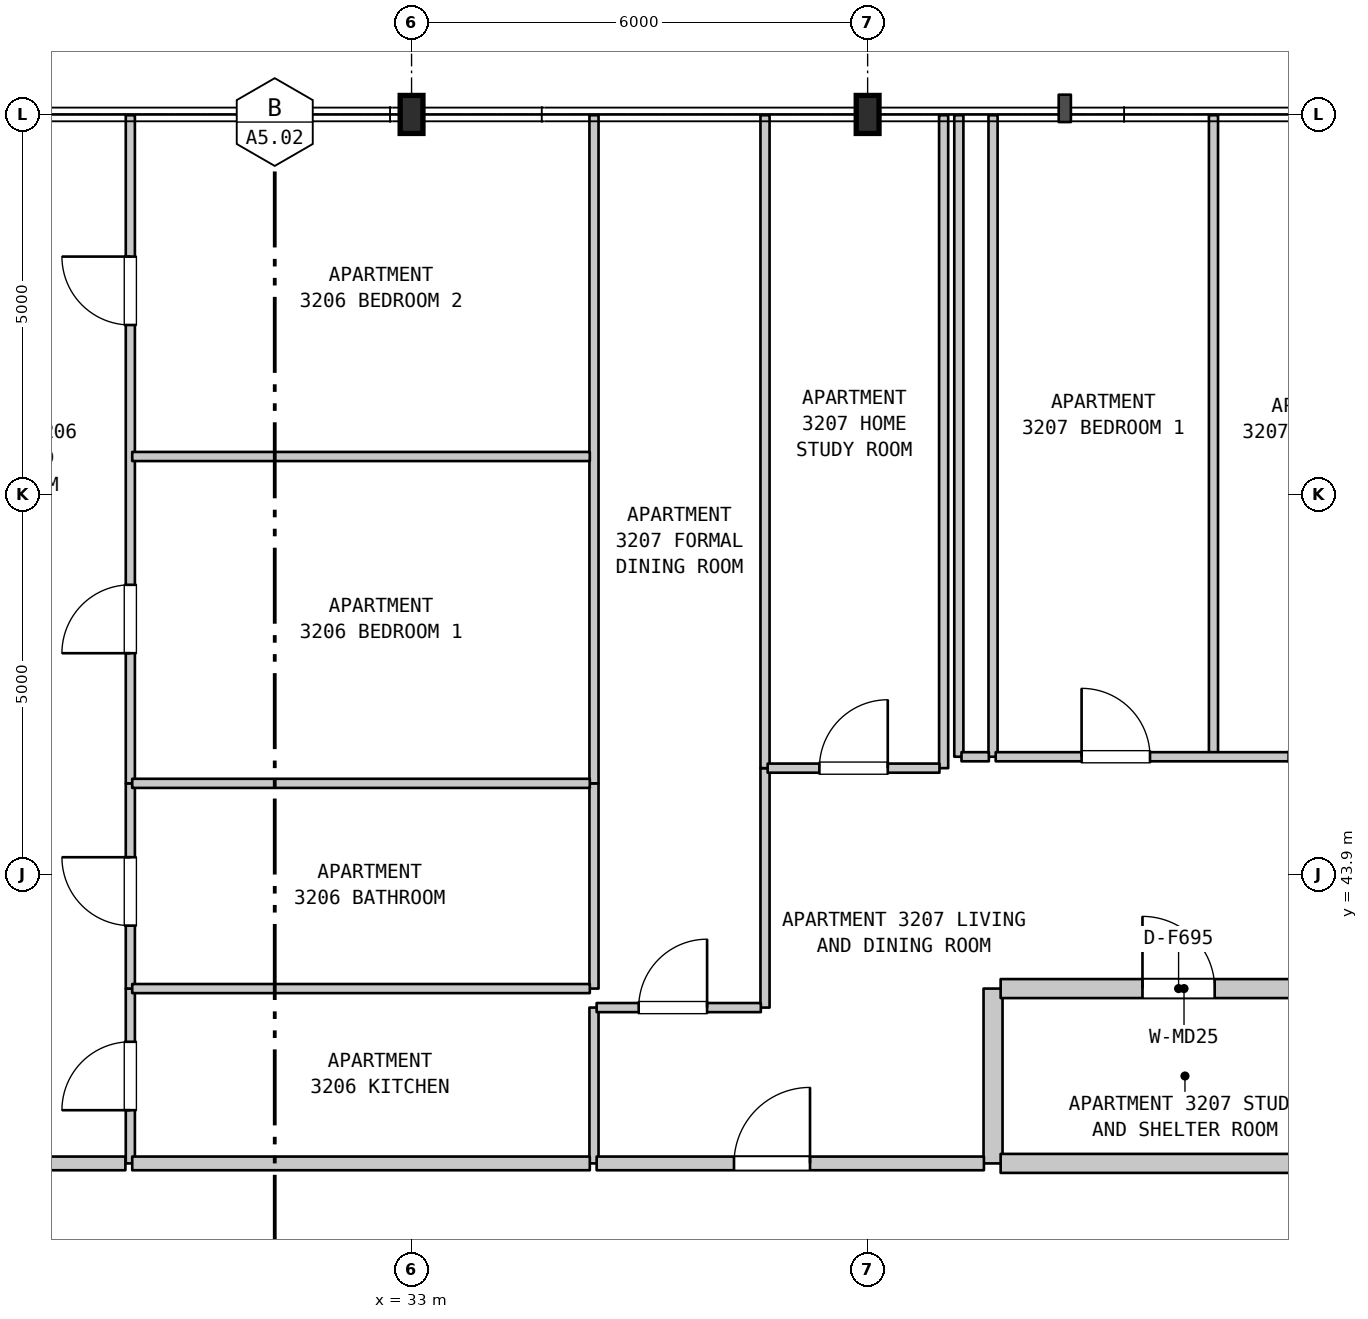
"""IFC4 building model, lengths in metres.
Left out: names, types, materials, properties, quantities, classifications, styles, units other than length and angle.
Written with IfcOpenShell. Run it as: python <this file> out.ifc"""

import sys

from ifc_helpers import new_model, si_unit, direction, frame, frame_2d, origin, origin_2d, place, context, subcontext, project, spatial, rectangle, i_section, extrude, element, fill, save


model = new_model("IFC4")
c1 = context("Model", 3, precision=1e-05, world=origin(), true_north=direction((0.0, 1.0)))
c2 = subcontext(c1, "Body", "Model", "MODEL_VIEW")
j1 = project(units=[si_unit("LENGTHUNIT", "METRE"), si_unit("PLANEANGLEUNIT", "RADIAN")], contexts=[c1])
p1 = place(None, origin())
s1 = spatial("IfcSite", under=j1, at=p1, CompositionType="ELEMENT")
p2 = place(p1, origin())
s2 = spatial("IfcBuilding", under=s1, at=p2, CompositionType="ELEMENT")
p3 = place(p2, frame((0.0, 0.0, 133.5)))
s3 = spatial("IfcBuildingStorey", under=s2, at=p3, CompositionType="ELEMENT", Elevation=133.5)
for number, where, z_axis, x_axis in (
    (1, (33.0, 53.9, 0.0), (0.0, 0.0, 1.0), (1.0, 0.0, 0.0)),
    (2, (39.0, 53.9, 0.0), (0.0, 0.0, 1.0), (1.0, 0.0, 0.0)),
):
    element("IfcColumn", number, at=place(p3, frame(where, z_axis=z_axis, x_axis=x_axis)), inside=s3, PredefinedType="COLUMN", context=c2, shape_type="SweptSolid", body=[
        extrude(i_section(OverallWidth=0.3, OverallDepth=0.5, WebThickness=0.014, FlangeThickness=0.028, FilletRadius=0.027, at=origin_2d()), origin(), (0.0, 0.0, 1.0), 3.7),
    ])
p4 = place(p3, frame((29.3, 40.1, 0.0), z_axis=(0.0, 0.0, 1.0), x_axis=(0.0, 1.0, 0.0)))
e3 = element("IfcWall", 3, at=p4, inside=s3, PredefinedType="PARTITIONING", context=c2, shape_type="SweptSolid", body=[
    extrude(rectangle(XDim=2.3, YDim=0.12, at=frame_2d((1.15, 0.0))), origin(), (0.0, 0.0, 1.0), 3.385),
])
p5 = place(p4, frame((0.7, 0.0, 0.0)))
e4 = element("IfcOpeningElement", 4, at=p5, cuts=e3, PredefinedType="OPENING", context=c2, shape_type="SweptSolid", body=[
    extrude(rectangle(XDim=0.9, YDim=2.15, at=frame_2d((0.45, 1.075))), frame((0.0, 0.07, 0.0), z_axis=(0.0, -1.0, 0.0), x_axis=(1.0, 0.0, 0.0)), (0.0, 0.0, 1.0), 0.14),
])
p6 = place(p3, frame((29.3, 42.4, 0.0), z_axis=(0.0, 0.0, 1.0), x_axis=(0.0, 1.0, 0.0)))
e5 = element("IfcWall", 5, at=p6, inside=s3, PredefinedType="PARTITIONING", context=c2, shape_type="SweptSolid", body=[
    extrude(rectangle(XDim=2.7, YDim=0.12, at=frame_2d((1.35, 0.0))), origin(), (0.0, 0.0, 1.0), 3.385),
])
p7 = place(p6, frame((0.828, 0.0, 0.0)))
e6 = element("IfcOpeningElement", 6, at=p7, cuts=e5, PredefinedType="OPENING", context=c2, shape_type="SweptSolid", body=[
    extrude(rectangle(XDim=0.9, YDim=2.1, at=frame_2d((0.45, 1.05))), frame((0.0, 0.07, 0.0), z_axis=(0.0, -1.0, 0.0), x_axis=(1.0, 0.0, 0.0)), (0.0, 0.0, 1.0), 0.14),
])
p8 = place(p3, frame((29.3, 45.1, 0.0), z_axis=(0.0, 0.0, 1.0), x_axis=(0.0, 1.0, 0.0)))
e7 = element("IfcWall", 7, at=p8, inside=s3, PredefinedType="PARTITIONING", context=c2, shape_type="SweptSolid", body=[
    extrude(rectangle(XDim=8.79, YDim=0.12, at=frame_2d((4.395, 0.0))), origin(), (0.0, 0.0, 1.0), 3.385),
])
p9 = place(p8, frame((1.712, 0.0, 0.0)))
e8 = element("IfcOpeningElement", 8, at=p9, cuts=e7, PredefinedType="OPENING", context=c2, shape_type="SweptSolid", body=[
    extrude(rectangle(XDim=0.9, YDim=2.15, at=frame_2d((0.45, 1.075))), frame((0.0, 0.07, 0.0), z_axis=(0.0, -1.0, 0.0), x_axis=(1.0, 0.0, 0.0)), (0.0, 0.0, 1.0), 0.14),
])
p10 = place(p8, frame((6.03, 0.0, 0.0)))
e9 = element("IfcOpeningElement", 9, at=p10, cuts=e7, PredefinedType="OPENING", context=c2, shape_type="SweptSolid", body=[
    extrude(rectangle(XDim=0.9, YDim=2.15, at=frame_2d((0.45, 1.075))), frame((0.0, 0.07, 0.0), z_axis=(0.0, -1.0, 0.0), x_axis=(1.0, 0.0, 0.0)), (0.0, 0.0, 1.0), 0.14),
])
p11 = place(p3, frame((35.4, 40.1, 0.0), z_axis=(0.0, 0.0, 1.0), x_axis=(0.0, 1.0, 0.0)))
e10 = element("IfcWall", 10, at=p11, inside=s3, PredefinedType="PARTITIONING", context=c2, shape_type="SweptSolid", body=[
    extrude(rectangle(XDim=2.05, YDim=0.12, at=frame_2d((1.025, 0.0))), origin(), (0.0, 0.0, 1.0), 3.385),
])
p12 = place(p3, frame((35.4, 42.4, 0.0), z_axis=(0.0, 0.0, 1.0), x_axis=(0.0, 1.0, 0.0)))
e11 = element("IfcWall", 11, at=p12, inside=s3, PredefinedType="PARTITIONING", context=c2, shape_type="SweptSolid", body=[
    extrude(rectangle(XDim=2.7, YDim=0.12, at=frame_2d((1.35, 0.0))), origin(), (0.0, 0.0, 1.0), 3.385),
])
p13 = place(p3, frame((35.4, 45.1, 0.0), z_axis=(0.0, 0.0, 1.0), x_axis=(0.0, 1.0, 0.0)))
e12 = element("IfcWall", 12, at=p13, inside=s3, PredefinedType="PARTITIONING", context=c2, shape_type="SweptSolid", body=[
    extrude(rectangle(XDim=8.79, YDim=0.12, at=frame_2d((4.395, 0.0))), origin(), (0.0, 0.0, 1.0), 3.385),
])
p14 = place(p3, frame((37.65, 42.15, 0.0), z_axis=(0.0, 0.0, 1.0), x_axis=(0.0, 1.0, 0.0)))
e13 = element("IfcWall", 13, at=p14, inside=s3, PredefinedType="PARTITIONING", context=c2, shape_type="SweptSolid", body=[
    extrude(rectangle(XDim=3.15, YDim=0.12, at=frame_2d((1.575, 0.0))), origin(), (0.0, 0.0, 1.0), 3.385),
])
for number, where, z_axis, x_axis in (
    (14, (37.65, 45.3, 0.0), (0.0, 0.0, 1.0), (0.0, 1.0, 0.0)),
    (15, (40.0, 45.3, 0.0), (0.0, 0.0, 1.0), (0.0, 1.0, 0.0)),
):
    element("IfcWall", number, at=place(p3, frame(where, z_axis=z_axis, x_axis=x_axis)), inside=s3, PredefinedType="PARTITIONING", context=c2, shape_type="SweptSolid", body=[
        extrude(rectangle(XDim=8.59, YDim=0.12, at=frame_2d((4.295, 0.0))), origin(), (0.0, 0.0, 1.0), 3.385),
    ])
p15 = place(p3, frame((40.2, 45.45, 0.0), z_axis=(0.0, 0.0, 1.0), x_axis=(0.0, 1.0, 0.0)))
e16 = element("IfcWall", 16, at=p15, inside=s3, PredefinedType="PARTITIONING", context=c2, shape_type="SweptSolid", body=[
    extrude(rectangle(XDim=8.44, YDim=0.12, at=frame_2d((4.22, 0.0))), origin(), (0.0, 0.0, 1.0), 3.385),
])
p16 = place(p3, frame((40.65, 40.1, 0.0), z_axis=(0.0, 0.0, 1.0), x_axis=(0.0, 1.0, 0.0)))
e17 = element("IfcWall", 17, at=p16, inside=s3, PredefinedType="STANDARD", context=c2, shape_type="SweptSolid", body=[
    extrude(rectangle(XDim=2.3, YDim=0.25, at=frame_2d((1.15, 0.0))), origin(), (0.0, 0.0, 1.0), 3.385),
])
for number, where, z_axis, x_axis in (
    (18, (40.65, 45.45, 0.0), (0.0, 0.0, 1.0), (0.0, 1.0, 0.0)),
    (19, (43.55, 45.45, 0.0), (0.0, 0.0, 1.0), (0.0, 1.0, 0.0)),
):
    element("IfcWall", number, at=place(p3, frame(where, z_axis=z_axis, x_axis=x_axis)), inside=s3, PredefinedType="PARTITIONING", context=c2, shape_type="SweptSolid", body=[
        extrude(rectangle(XDim=8.44, YDim=0.12, at=frame_2d((4.22, 0.0))), origin(), (0.0, 0.0, 1.0), 3.385),
    ])
p17 = place(p3, frame((20.475, 40.1, 0.0), z_axis=(0.0, 0.0, 1.0), x_axis=(1.0, 0.0, 0.0)))
e20 = element("IfcWall", 20, at=p17, inside=s3, PredefinedType="STANDARD", context=c2, shape_type="SweptSolid", body=[
    extrude(rectangle(XDim=8.76, YDim=0.18, at=frame_2d((4.38, 0.0))), origin(), (0.0, 0.0, 1.0), 3.385),
])
p18 = place(p17, frame((2.035, 0.0, 0.0)))
e21 = element("IfcOpeningElement", 21, at=p18, cuts=e20, PredefinedType="OPENING", context=c2, shape_type="SweptSolid", body=[
    extrude(rectangle(XDim=1.0, YDim=2.15, at=frame_2d((0.5, 1.075))), frame((0.0, 0.1, 0.0), z_axis=(0.0, -1.0, 0.0), x_axis=(1.0, 0.0, 0.0)), (0.0, 0.0, 1.0), 0.2),
])
p19 = place(p17, frame((6.409, 0.0, 0.0)))
e22 = element("IfcOpeningElement", 22, at=p19, cuts=e20, PredefinedType="OPENING", context=c2, shape_type="SweptSolid", body=[
    extrude(rectangle(XDim=1.0, YDim=2.15, at=frame_2d((0.5, 1.075))), frame((0.0, 0.1, 0.0), z_axis=(0.0, -1.0, 0.0), x_axis=(1.0, 0.0, 0.0)), (0.0, 0.0, 1.0), 0.2),
])
p20 = place(p3, frame((29.325, 40.1, 0.0), z_axis=(0.0, 0.0, 1.0), x_axis=(1.0, 0.0, 0.0)))
e23 = element("IfcWall", 23, at=p20, inside=s3, PredefinedType="STANDARD", context=c2, shape_type="SweptSolid", body=[
    extrude(rectangle(XDim=6.02, YDim=0.18, at=frame_2d((3.01, 0.0))), origin(), (0.0, 0.0, 1.0), 3.385),
])
p21 = place(p3, frame((35.435, 40.1, 0.0), z_axis=(0.0, 0.0, 1.0), x_axis=(1.0, 0.0, 0.0)))
e24 = element("IfcWall", 24, at=p21, inside=s3, PredefinedType="STANDARD", context=c2, shape_type="SweptSolid", body=[
    extrude(rectangle(XDim=5.095, YDim=0.18, at=frame_2d((2.547, 0.0))), origin(), (0.0, 0.0, 1.0), 3.385),
])
p22 = place(p21, frame((1.807, 0.0, 0.0)))
e25 = element("IfcOpeningElement", 25, at=p22, cuts=e24, PredefinedType="OPENING", context=c2, shape_type="SweptSolid", body=[
    extrude(rectangle(XDim=1.0, YDim=2.15, at=frame_2d((0.5, 1.075))), frame((0.0, 0.1, 0.0), z_axis=(0.0, -1.0, 0.0), x_axis=(1.0, 0.0, 0.0)), (0.0, 0.0, 1.0), 0.2),
])
p23 = place(p3, frame((40.75, 40.1, 0.0), z_axis=(0.0, 0.0, 1.0), x_axis=(1.0, 0.0, 0.0)))
e26 = element("IfcWall", 26, at=p23, inside=s3, PredefinedType="STANDARD", context=c2, shape_type="SweptSolid", body=[
    extrude(rectangle(XDim=4.19, YDim=0.25, at=frame_2d((2.095, 0.0))), origin(), (0.0, 0.0, 1.0), 3.385),
])
p24 = place(p3, frame((35.435, 42.15, 0.0), z_axis=(0.0, 0.0, 1.0), x_axis=(1.0, 0.0, 0.0)))
e27 = element("IfcWall", 27, at=p24, inside=s3, PredefinedType="PARTITIONING", context=c2, shape_type="SweptSolid", body=[
    extrude(rectangle(XDim=2.16, YDim=0.12, at=frame_2d((1.08, 0.0))), origin(), (0.0, 0.0, 1.0), 3.385),
])
p25 = place(p24, frame((0.553, 0.0, 0.0)))
e28 = element("IfcOpeningElement", 28, at=p25, cuts=e27, PredefinedType="OPENING", context=c2, shape_type="SweptSolid", body=[
    extrude(rectangle(XDim=0.9, YDim=2.15, at=frame_2d((0.45, 1.075))), frame((0.0, 0.07, 0.0), z_axis=(0.0, -1.0, 0.0), x_axis=(1.0, 0.0, 0.0)), (0.0, 0.0, 1.0), 0.14),
])
p26 = place(p3, frame((29.325, 42.4, 0.0), z_axis=(0.0, 0.0, 1.0), x_axis=(1.0, 0.0, 0.0)))
e29 = element("IfcWall", 29, at=p26, inside=s3, PredefinedType="PARTITIONING", context=c2, shape_type="SweptSolid", body=[
    extrude(rectangle(XDim=6.02, YDim=0.12, at=frame_2d((3.01, 0.0))), origin(), (0.0, 0.0, 1.0), 3.385),
])
p27 = place(p3, frame((40.75, 42.4, 0.0), z_axis=(0.0, 0.0, 1.0), x_axis=(1.0, 0.0, 0.0)))
e30 = element("IfcWall", 30, at=p27, inside=s3, PredefinedType="STANDARD", context=c2, shape_type="SweptSolid", body=[
    extrude(rectangle(XDim=4.825, YDim=0.25, at=frame_2d((2.413, 0.0))), origin(), (0.0, 0.0, 1.0), 3.385),
])
p28 = place(p27, frame((1.866, 0.0, 0.0)))
e31 = element("IfcOpeningElement", 31, at=p28, cuts=e30, PredefinedType="OPENING", context=c2, shape_type="SweptSolid", body=[
    extrude(rectangle(XDim=0.95, YDim=2.15, at=frame_2d((0.475, 1.075))), frame((0.0, 0.135, 0.0), z_axis=(0.0, -1.0, 0.0), x_axis=(1.0, 0.0, 0.0)), (0.0, 0.0, 1.0), 0.27),
])
p29 = place(p3, frame((29.325, 45.1, 0.0), z_axis=(0.0, 0.0, 1.0), x_axis=(1.0, 0.0, 0.0)))
e32 = element("IfcWall", 32, at=p29, inside=s3, PredefinedType="PARTITIONING", context=c2, shape_type="SweptSolid", body=[
    extrude(rectangle(XDim=6.02, YDim=0.12, at=frame_2d((3.01, 0.0))), origin(), (0.0, 0.0, 1.0), 3.385),
])
p30 = place(p3, frame((37.685, 45.3, 0.0), z_axis=(0.0, 0.0, 1.0), x_axis=(1.0, 0.0, 0.0)))
e33 = element("IfcWall", 33, at=p30, inside=s3, PredefinedType="PARTITIONING", context=c2, shape_type="SweptSolid", body=[
    extrude(rectangle(XDim=2.26, YDim=0.12, at=frame_2d((1.13, 0.0))), origin(), (0.0, 0.0, 1.0), 3.385),
])
p31 = place(p30, frame((0.68, 0.0, 0.0)))
e34 = element("IfcOpeningElement", 34, at=p31, cuts=e33, PredefinedType="OPENING", context=c2, shape_type="SweptSolid", body=[
    extrude(rectangle(XDim=0.9, YDim=2.15, at=frame_2d((0.45, 1.075))), frame((0.0, 0.07, 0.0), z_axis=(0.0, -1.0, 0.0), x_axis=(1.0, 0.0, 0.0)), (0.0, 0.0, 1.0), 0.14),
])
p32 = place(p3, frame((40.235, 45.45, 0.0), z_axis=(0.0, 0.0, 1.0), x_axis=(1.0, 0.0, 0.0)))
e35 = element("IfcWall", 35, at=p32, inside=s3, PredefinedType="PARTITIONING", context=c2, shape_type="SweptSolid", body=[
    extrude(rectangle(XDim=0.36, YDim=0.12, at=frame_2d((0.18, 0.0))), origin(), (0.0, 0.0, 1.0), 3.385),
])
p33 = place(p3, frame((40.685, 45.45, 0.0), z_axis=(0.0, 0.0, 1.0), x_axis=(1.0, 0.0, 0.0)))
e36 = element("IfcWall", 36, at=p33, inside=s3, PredefinedType="PARTITIONING", context=c2, shape_type="SweptSolid", body=[
    extrude(rectangle(XDim=16.643, YDim=0.12, at=frame_2d((8.321, 0.0))), origin(), (0.0, 0.0, 1.0), 3.385),
])
p34 = place(p33, frame((1.13, 0.0, 0.0)))
e37 = element("IfcOpeningElement", 37, at=p34, cuts=e36, PredefinedType="OPENING", context=c2, shape_type="SweptSolid", body=[
    extrude(rectangle(XDim=0.9, YDim=2.15, at=frame_2d((0.45, 1.075))), frame((0.0, 0.07, 0.0), z_axis=(0.0, -1.0, 0.0), x_axis=(1.0, 0.0, 0.0)), (0.0, 0.0, 1.0), 0.14),
])
p35 = place(p33, frame((3.854, 0.0, 0.0)))
e38 = element("IfcOpeningElement", 38, at=p35, cuts=e36, PredefinedType="OPENING", context=c2, shape_type="SweptSolid", body=[
    extrude(rectangle(XDim=0.9, YDim=2.15, at=frame_2d((0.45, 1.075))), frame((0.0, 0.07, 0.0), z_axis=(0.0, -1.0, 0.0), x_axis=(1.0, 0.0, 0.0)), (0.0, 0.0, 1.0), 0.14),
])
p36 = place(p33, frame((6.754, 0.0, 0.0)))
e39 = element("IfcOpeningElement", 39, at=p36, cuts=e36, PredefinedType="OPENING", context=c2, shape_type="SweptSolid", body=[
    extrude(rectangle(XDim=0.9, YDim=2.15, at=frame_2d((0.45, 1.075))), frame((0.0, 0.07, 0.0), z_axis=(0.0, -1.0, 0.0), x_axis=(1.0, 0.0, 0.0)), (0.0, 0.0, 1.0), 0.14),
])
p37 = place(p33, frame((9.654, 0.0, 0.0)))
e40 = element("IfcOpeningElement", 40, at=p37, cuts=e36, PredefinedType="OPENING", context=c2, shape_type="SweptSolid", body=[
    extrude(rectangle(XDim=0.9, YDim=2.15, at=frame_2d((0.45, 1.075))), frame((0.0, 0.07, 0.0), z_axis=(0.0, -1.0, 0.0), x_axis=(1.0, 0.0, 0.0)), (0.0, 0.0, 1.0), 0.14),
])
p38 = place(p33, frame((12.553, 0.0, 0.0)))
e41 = element("IfcOpeningElement", 41, at=p38, cuts=e36, PredefinedType="OPENING", context=c2, shape_type="SweptSolid", body=[
    extrude(rectangle(XDim=0.9, YDim=2.15, at=frame_2d((0.45, 1.075))), frame((0.0, 0.07, 0.0), z_axis=(0.0, -1.0, 0.0), x_axis=(1.0, 0.0, 0.0)), (0.0, 0.0, 1.0), 0.14),
])
p39 = place(p3, frame((29.325, 49.4, 0.0), z_axis=(0.0, 0.0, 1.0), x_axis=(1.0, 0.0, 0.0)))
e42 = element("IfcWall", 42, at=p39, inside=s3, PredefinedType="PARTITIONING", context=c2, shape_type="SweptSolid", body=[
    extrude(rectangle(XDim=6.02, YDim=0.12, at=frame_2d((3.01, 0.0))), origin(), (0.0, 0.0, 1.0), 3.385),
])
p40 = place(p5, origin())
e43 = element("IfcDoor", 43, at=p40, inside=s3, OperationType="SINGLE_SWING_LEFT", PredefinedType="DOOR", context=c2, shape_type="SweptSolid", body=[
    extrude(rectangle(XDim=0.9, YDim=2.15, at=frame_2d((0.45, 1.075))), frame((0.0, 0.025, 0.0), z_axis=(0.0, -1.0, 0.0), x_axis=(1.0, 0.0, 0.0)), (0.0, 0.0, 1.0), 0.05),
])
fill(e4, e43)
p41 = place(p7, origin())
e44 = element("IfcDoor", 44, at=p41, inside=s3, OperationType="SINGLE_SWING_RIGHT", PredefinedType="DOOR", context=c2, shape_type="SweptSolid", body=[
    extrude(rectangle(XDim=0.9, YDim=2.1, at=frame_2d((0.45, 1.05))), frame((0.0, 0.025, 0.0), z_axis=(0.0, -1.0, 0.0), x_axis=(1.0, 0.0, 0.0)), (0.0, 0.0, 1.0), 0.05),
])
fill(e6, e44)
p42 = place(p9, origin())
e45 = element("IfcDoor", 45, at=p42, inside=s3, OperationType="SINGLE_SWING_LEFT", PredefinedType="DOOR", context=c2, shape_type="SweptSolid", body=[
    extrude(rectangle(XDim=0.9, YDim=2.15, at=frame_2d((0.45, 1.075))), frame((0.0, 0.025, 0.0), z_axis=(0.0, -1.0, 0.0), x_axis=(1.0, 0.0, 0.0)), (0.0, 0.0, 1.0), 0.05),
])
fill(e8, e45)
p43 = place(p10, origin())
e46 = element("IfcDoor", 46, at=p43, inside=s3, OperationType="SINGLE_SWING_RIGHT", PredefinedType="DOOR", context=c2, shape_type="SweptSolid", body=[
    extrude(rectangle(XDim=0.9, YDim=2.15, at=frame_2d((0.45, 1.075))), frame((0.0, 0.025, 0.0), z_axis=(0.0, -1.0, 0.0), x_axis=(1.0, 0.0, 0.0)), (0.0, 0.0, 1.0), 0.05),
])
fill(e9, e46)
p44 = place(p22, origin())
e47 = element("IfcDoor", 47, at=p44, inside=s3, OperationType="SINGLE_SWING_RIGHT", PredefinedType="DOOR", context=c2, shape_type="SweptSolid", body=[
    extrude(rectangle(XDim=1.0, YDim=2.15, at=frame_2d((0.5, 1.075))), frame((0.0, 0.025, 0.0), z_axis=(0.0, -1.0, 0.0), x_axis=(1.0, 0.0, 0.0)), (0.0, 0.0, 1.0), 0.05),
])
fill(e25, e47)
p45 = place(p25, origin())
e48 = element("IfcDoor", 48, at=p45, inside=s3, OperationType="SINGLE_SWING_RIGHT", PredefinedType="DOOR", context=c2, shape_type="SweptSolid", body=[
    extrude(rectangle(XDim=0.9, YDim=2.15, at=frame_2d((0.45, 1.075))), frame((0.0, 0.025, 0.0), z_axis=(0.0, -1.0, 0.0), x_axis=(1.0, 0.0, 0.0)), (0.0, 0.0, 1.0), 0.05),
])
fill(e28, e48)
p46 = place(p28, origin())
e49 = element("IfcDoor", 49, at=p46, inside=s3, OperationType="SINGLE_SWING_LEFT", PredefinedType="DOOR", context=c2, shape_type="SweptSolid", body=[
    extrude(rectangle(XDim=0.95, YDim=2.15, at=frame_2d((0.475, 1.075))), frame((0.0, 0.025, 0.0), z_axis=(0.0, -1.0, 0.0), x_axis=(1.0, 0.0, 0.0)), (0.0, 0.0, 1.0), 0.05),
])
fill(e31, e49)
p47 = place(p31, origin())
e50 = element("IfcDoor", 50, at=p47, inside=s3, OperationType="SINGLE_SWING_RIGHT", PredefinedType="DOOR", context=c2, shape_type="SweptSolid", body=[
    extrude(rectangle(XDim=0.9, YDim=2.15, at=frame_2d((0.45, 1.075))), frame((0.0, 0.025, 0.0), z_axis=(0.0, -1.0, 0.0), x_axis=(1.0, 0.0, 0.0)), (0.0, 0.0, 1.0), 0.05),
])
fill(e34, e50)
p48 = place(p34, origin())
e51 = element("IfcDoor", 51, at=p48, inside=s3, OperationType="SINGLE_SWING_LEFT", PredefinedType="DOOR", context=c2, shape_type="SweptSolid", body=[
    extrude(rectangle(XDim=0.9, YDim=2.15, at=frame_2d((0.45, 1.075))), frame((0.0, 0.025, 0.0), z_axis=(0.0, -1.0, 0.0), x_axis=(1.0, 0.0, 0.0)), (0.0, 0.0, 1.0), 0.05),
])
fill(e37, e51)
p49 = place(p35, origin())
e52 = element("IfcDoor", 52, at=p49, inside=s3, OperationType="SINGLE_SWING_RIGHT", PredefinedType="DOOR", context=c2, shape_type="SweptSolid", body=[
    extrude(rectangle(XDim=0.9, YDim=2.15, at=frame_2d((0.45, 1.075))), frame((0.0, 0.025, 0.0), z_axis=(0.0, -1.0, 0.0), x_axis=(1.0, 0.0, 0.0)), (0.0, 0.0, 1.0), 0.05),
])
fill(e38, e52)
save(model, sys.argv[1])
